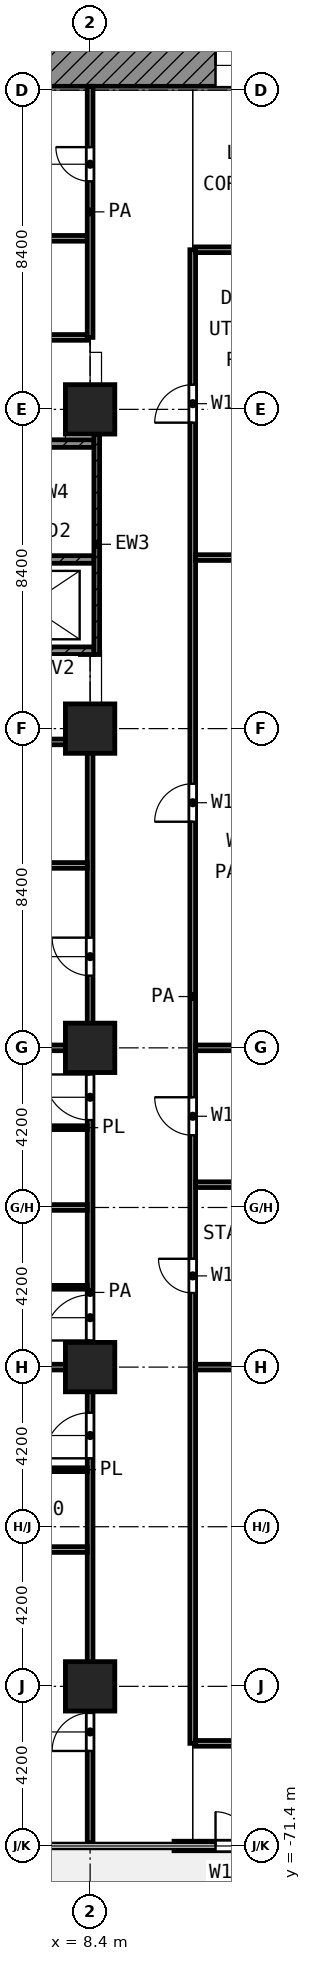
"""IFC4 building model, lengths in metres.
Left out: names, types, materials, properties, quantities, classifications, styles, units other than length and angle.
Written with IfcOpenShell. Run it as: python <this file> out.ifc"""

import sys

from ifc_helpers import new_model, si_unit, direction, frame, frame_2d, origin, origin_2d, place, context, subcontext, project, spatial, rectangle, extrude, element, fill, save


model = new_model("IFC4")
c1 = context("Model", 3, precision=1e-05, world=origin(), true_north=direction((0.0, 1.0)))
c2 = subcontext(c1, "Body", "Model", "MODEL_VIEW")
j1 = project(units=[si_unit("LENGTHUNIT", "METRE"), si_unit("PLANEANGLEUNIT", "RADIAN")], contexts=[c1])
p1 = place(None, origin())
s1 = spatial("IfcSite", under=j1, at=p1, CompositionType="ELEMENT")
p2 = place(p1, origin())
s2 = spatial("IfcBuilding", under=s1, at=p2, CompositionType="ELEMENT")
p3 = place(p2, frame((0.0, 0.0, 51.8)))
s3 = spatial("IfcBuildingStorey", under=s2, at=p3, CompositionType="ELEMENT", Elevation=51.8)
for number, where, z_axis, x_axis in (
    (1, (8.4, -33.6, 0.0), (0.0, 0.0, 1.0), (1.0, 0.0, 0.0)),
    (2, (8.4, -42.0, 0.0), (0.0, 0.0, 1.0), (1.0, 0.0, 0.0)),
    (3, (8.4, -50.4, 0.0), (0.0, 0.0, 1.0), (1.0, 0.0, 0.0)),
    (4, (8.4, -58.8, 0.0), (0.0, 0.0, 1.0), (1.0, 0.0, 0.0)),
    (5, (8.4, -67.2, 0.0), (0.0, 0.0, 1.0), (1.0, 0.0, 0.0)),
):
    element("IfcColumn", number, at=place(p3, frame(where, z_axis=z_axis, x_axis=x_axis)), inside=s3, PredefinedType="COLUMN", context=c2, shape_type="SweptSolid", body=[
        extrude(rectangle(XDim=1.3, YDim=1.3, at=origin_2d()), origin(), (0.0, 0.0, 1.0), 4.2),
    ])
p4 = place(p3, frame((10.608, -71.4, 0.0), z_axis=(0.0, 0.0, 1.0), x_axis=(1.0, 0.0, 0.0)))
e6 = element("IfcWall", 6, at=p4, inside=s3, PredefinedType="SOLIDWALL", context=c2, shape_type="SweptSolid", body=[
    extrude(rectangle(XDim=3.983, YDim=0.25, at=frame_2d((1.992, 0.0))), origin(), (0.0, 0.0, 1.0), 3.78),
])
p5 = place(p4, frame((1.092, 0.0, 0.0)))
e7 = element("IfcOpeningElement", 7, at=p5, cuts=e6, PredefinedType="OPENING", context=c2, shape_type="SweptSolid", body=[
    extrude(rectangle(XDim=1.8, YDim=2.1, at=frame_2d((0.9, 1.05))), frame((0.0, 0.135, 0.0), z_axis=(0.0, -1.0, 0.0), x_axis=(1.0, 0.0, 0.0)), (0.0, 0.0, 1.0), 0.27),
])
p6 = place(p3, frame((5.4, -24.55, 0.0), z_axis=(0.0, 0.0, 1.0), x_axis=(1.0, 0.0, 0.0)))
e8 = element("IfcWall", 8, at=p6, inside=s3, PredefinedType="SHEAR", context=c2, shape_type="SweptSolid", body=[
    extrude(rectangle(XDim=18.6, YDim=1.1, at=frame_2d((9.3, 0.0))), origin(), (0.0, 0.0, 1.0), 3.9),
])
p7 = place(p6, frame((6.3, 0.0, 0.0)))
e9 = element("IfcOpeningElement", 9, at=p7, cuts=e8, PredefinedType="OPENING", context=c2, shape_type="SweptSolid", body=[
    extrude(rectangle(XDim=1.8, YDim=2.1, at=frame_2d((0.9, 1.05))), frame((0.0, 0.56, 0.0), z_axis=(0.0, -1.0, 0.0), x_axis=(1.0, 0.0, 0.0)), (0.0, 0.0, 1.0), 1.12),
])
p8 = place(p3, frame((8.575, -40.05, 0.0), z_axis=(0.0, 0.0, 1.0), x_axis=(0.0, 1.0, 0.0)))
e10 = element("IfcWall", 10, at=p8, inside=s3, PredefinedType="SHEAR", context=c2, shape_type="SweptSolid", body=[
    extrude(rectangle(XDim=5.8, YDim=0.15, at=frame_2d((2.9, 0.0))), origin(), (0.0, 0.0, 1.0), 3.9),
])
p9 = place(p3, frame((0.45, -34.5, 0.0), z_axis=(0.0, 0.0, 1.0), x_axis=(1.0, 0.0, 0.0)))
e11 = element("IfcWall", 11, at=p9, inside=s3, PredefinedType="SHEAR", context=c2, shape_type="SweptSolid", body=[
    extrude(rectangle(XDim=8.05, YDim=0.2, at=frame_2d((4.025, 0.0))), origin(), (0.0, 0.0, 1.0), 3.9),
])
p10 = place(p9, frame((0.75, 0.0, 0.0)))
e12 = element("IfcOpeningElement", 12, at=p10, cuts=e11, PredefinedType="OPENING", context=c2, shape_type="SweptSolid", body=[
    extrude(rectangle(XDim=1.1, YDim=2.1, at=frame_2d((0.55, 1.05))), frame((0.0, 0.11, 0.0), z_axis=(0.0, -1.0, 0.0), x_axis=(1.0, 0.0, 0.0)), (0.0, 0.0, 1.0), 0.22),
])
p11 = place(p3, frame((0.45, -37.55, 0.0), z_axis=(0.0, 0.0, 1.0), x_axis=(1.0, 0.0, 0.0)))
e13 = element("IfcWall", 13, at=p11, inside=s3, PredefinedType="SHEAR", context=c2, shape_type="SweptSolid", body=[
    extrude(rectangle(XDim=8.05, YDim=0.2, at=frame_2d((4.025, 0.0))), origin(), (0.0, 0.0, 1.0), 3.9),
])
p12 = place(p11, frame((0.1, 0.0, 0.0)))
e14 = element("IfcOpeningElement", 14, at=p12, cuts=e13, PredefinedType="OPENING", context=c2, shape_type="SweptSolid", body=[
    extrude(rectangle(XDim=1.1, YDim=2.1, at=frame_2d((0.55, 1.05))), frame((0.0, 0.11, 0.0), z_axis=(0.0, -1.0, 0.0), x_axis=(1.0, 0.0, 0.0)), (0.0, 0.0, 1.0), 0.22),
])
p13 = place(p3, frame((0.45, -39.95, 0.0), z_axis=(0.0, 0.0, 1.0), x_axis=(1.0, 0.0, 0.0)))
e15 = element("IfcWall", 15, at=p13, inside=s3, PredefinedType="SHEAR", context=c2, shape_type="SweptSolid", body=[
    extrude(rectangle(XDim=8.05, YDim=0.2, at=frame_2d((4.025, 0.0))), origin(), (0.0, 0.0, 1.0), 3.9),
])
p14 = place(p13, frame((2.0, 0.0, 0.0)))
e16 = element("IfcOpeningElement", 16, at=p14, cuts=e15, PredefinedType="OPENING", context=c2, shape_type="SweptSolid", body=[
    extrude(rectangle(XDim=1.1, YDim=2.1, at=frame_2d((0.55, 1.05))), frame((0.0, 0.11, 0.0), z_axis=(0.0, -1.0, 0.0), x_axis=(1.0, 0.0, 0.0)), (0.0, 0.0, 1.0), 0.22),
])
p15 = place(p3, frame((5.15, -61.5, 0.0), z_axis=(0.0, 0.0, 1.0), x_axis=(1.0, 0.0, 0.0)))
e17 = element("IfcWall", 17, at=p15, inside=s3, PredefinedType="PARTITIONING", context=c2, shape_type="SweptSolid", body=[
    extrude(rectangle(XDim=3.175, YDim=0.1, at=frame_2d((1.587, 0.0))), origin(), (0.0, 0.0, 1.0), 3.9),
])
for number, where, z_axis, x_axis in (
    (18, (5.75, -56.7, 0.0), (0.0, 0.0, 1.0), (1.0, 0.0, 0.0)),
    (19, (5.75, -52.5, 0.0), (0.0, 0.0, 1.0), (1.0, 0.0, 0.0)),
):
    element("IfcWall", number, at=place(p3, frame(where, z_axis=z_axis, x_axis=x_axis)), inside=s3, PredefinedType="PARTITIONING", context=c2, shape_type="SweptSolid", body=[
        extrude(rectangle(XDim=2.575, YDim=0.1, at=frame_2d((1.288, 0.0))), origin(), (0.0, 0.0, 1.0), 3.9),
    ])
p16 = place(p3, frame((11.175, -68.7, 0.0), z_axis=(0.0, 0.0, 1.0), x_axis=(1.0, 0.0, 0.0)))
e20 = element("IfcWall", 20, at=p16, inside=s3, PredefinedType="PARTITIONING", context=c2, shape_type="SweptSolid", body=[
    extrude(rectangle(XDim=2.85, YDim=0.15, at=frame_2d((1.425, 0.0))), origin(), (0.0, 0.0, 1.0), 3.9),
])
for number, where, z_axis, x_axis in (
    (21, (0.08, -63.6, 0.0), (0.0, 0.0, 1.0), (1.0, 0.0, 0.0)),
    (22, (0.08, -58.8, 0.0), (0.0, 0.0, 1.0), (1.0, 0.0, 0.0)),
):
    element("IfcWall", number, at=place(p3, frame(where, z_axis=z_axis, x_axis=x_axis)), inside=s3, PredefinedType="PARTITIONING", context=c2, shape_type="SweptSolid", body=[
        extrude(rectangle(XDim=8.245, YDim=0.15, at=frame_2d((4.123, 0.0))), origin(), (0.0, 0.0, 1.0), 3.9),
    ])
p17 = place(p3, frame((11.175, -58.8, 0.0), z_axis=(0.0, 0.0, 1.0), x_axis=(1.0, 0.0, 0.0)))
e23 = element("IfcWall", 23, at=p17, inside=s3, PredefinedType="PARTITIONING", context=c2, shape_type="SweptSolid", body=[
    extrude(rectangle(XDim=2.85, YDim=0.15, at=frame_2d((1.425, 0.0))), origin(), (0.0, 0.0, 1.0), 3.9),
])
p18 = place(p3, frame((0.08, -54.6, 0.0), z_axis=(0.0, 0.0, 1.0), x_axis=(1.0, 0.0, 0.0)))
e24 = element("IfcWall", 24, at=p18, inside=s3, PredefinedType="PARTITIONING", context=c2, shape_type="SweptSolid", body=[
    extrude(rectangle(XDim=8.245, YDim=0.15, at=frame_2d((4.123, 0.0))), origin(), (0.0, 0.0, 1.0), 3.9),
])
p19 = place(p3, frame((11.175, -54.0, 0.0), z_axis=(0.0, 0.0, 1.0), x_axis=(1.0, 0.0, 0.0)))
e25 = element("IfcWall", 25, at=p19, inside=s3, PredefinedType="PARTITIONING", context=c2, shape_type="SweptSolid", body=[
    extrude(rectangle(XDim=2.85, YDim=0.15, at=frame_2d((1.425, 0.0))), origin(), (0.0, 0.0, 1.0), 3.9),
])
p20 = place(p3, frame((0.08, -50.4, 0.0), z_axis=(0.0, 0.0, 1.0), x_axis=(1.0, 0.0, 0.0)))
e26 = element("IfcWall", 26, at=p20, inside=s3, PredefinedType="PARTITIONING", context=c2, shape_type="SweptSolid", body=[
    extrude(rectangle(XDim=8.245, YDim=0.15, at=frame_2d((4.123, 0.0))), origin(), (0.0, 0.0, 1.0), 3.9),
])
p21 = place(p3, frame((11.175, -50.4, 0.0), z_axis=(0.0, 0.0, 1.0), x_axis=(1.0, 0.0, 0.0)))
e27 = element("IfcWall", 27, at=p21, inside=s3, PredefinedType="PARTITIONING", context=c2, shape_type="SweptSolid", body=[
    extrude(rectangle(XDim=2.85, YDim=0.15, at=frame_2d((1.425, 0.0))), origin(), (0.0, 0.0, 1.0), 3.9),
])
p22 = place(p3, frame((0.08, -45.6, 0.0), z_axis=(0.0, 0.0, 1.0), x_axis=(1.0, 0.0, 0.0)))
e28 = element("IfcWall", 28, at=p22, inside=s3, PredefinedType="PARTITIONING", context=c2, shape_type="SweptSolid", body=[
    extrude(rectangle(XDim=8.245, YDim=0.15, at=frame_2d((4.123, 0.0))), origin(), (0.0, 0.0, 1.0), 3.9),
])
p23 = place(p3, frame((2.327, -42.35, 0.0), z_axis=(0.0, 0.0, 1.0), x_axis=(1.0, 0.0, 0.0)))
e29 = element("IfcWall", 29, at=p23, inside=s3, PredefinedType="PARTITIONING", context=c2, shape_type="SweptSolid", body=[
    extrude(rectangle(XDim=5.998, YDim=0.15, at=frame_2d((2.999, 0.0))), origin(), (0.0, 0.0, 1.0), 3.9),
])
p24 = place(p23, frame((2.499, 0.0, 0.0)))
e30 = element("IfcOpeningElement", 30, at=p24, cuts=e29, PredefinedType="OPENING", context=c2, shape_type="SweptSolid", body=[
    extrude(rectangle(XDim=1.0, YDim=2.1, at=frame_2d((0.5, 1.05))), frame((0.0, 0.085, 0.0), z_axis=(0.0, -1.0, 0.0), x_axis=(1.0, 0.0, 0.0)), (0.0, 0.0, 1.0), 0.17),
])
p25 = place(p3, frame((11.175, -37.5, 0.0), z_axis=(0.0, 0.0, 1.0), x_axis=(1.0, 0.0, 0.0)))
e31 = element("IfcWall", 31, at=p25, inside=s3, PredefinedType="PARTITIONING", context=c2, shape_type="SweptSolid", body=[
    extrude(rectangle(XDim=2.85, YDim=0.15, at=frame_2d((1.425, 0.0))), origin(), (0.0, 0.0, 1.0), 3.9),
])
p26 = place(p3, frame((1.077, -31.707, 0.0), z_axis=(0.0, 0.0, 1.0), x_axis=(1.0, 0.0, 0.0)))
e32 = element("IfcWall", 32, at=p26, inside=s3, PredefinedType="PARTITIONING", context=c2, shape_type="SweptSolid", body=[
    extrude(rectangle(XDim=7.248, YDim=0.15, at=frame_2d((3.624, 0.0))), origin(), (0.0, 0.0, 1.0), 3.9),
])
p27 = place(p26, frame((3.024, 0.0, 0.0)))
e33 = element("IfcOpeningElement", 33, at=p27, cuts=e32, PredefinedType="OPENING", context=c2, shape_type="SweptSolid", body=[
    extrude(rectangle(XDim=1.2, YDim=2.1, at=frame_2d((0.6, 1.05))), frame((0.0, 0.085, 0.0), z_axis=(0.0, -1.0, 0.0), x_axis=(1.0, 0.0, 0.0)), (0.0, 0.0, 1.0), 0.17),
])
p28 = place(p3, frame((11.175, -29.4, 0.0), z_axis=(0.0, 0.0, 1.0), x_axis=(1.0, 0.0, 0.0)))
e34 = element("IfcWall", 34, at=p28, inside=s3, PredefinedType="PARTITIONING", context=c2, shape_type="SweptSolid", body=[
    extrude(rectangle(XDim=2.85, YDim=0.15, at=frame_2d((1.425, 0.0))), origin(), (0.0, 0.0, 1.0), 3.9),
])
p29 = place(p3, frame((0.08, -29.1, 0.0), z_axis=(0.0, 0.0, 1.0), x_axis=(1.0, 0.0, 0.0)))
e35 = element("IfcWall", 35, at=p29, inside=s3, PredefinedType="PARTITIONING", context=c2, shape_type="SweptSolid", body=[
    extrude(rectangle(XDim=8.245, YDim=0.15, at=frame_2d((4.123, 0.0))), origin(), (0.0, 0.0, 1.0), 3.9),
])
p30 = place(p3, frame((8.4, -71.32, 0.0), z_axis=(0.0, 0.0, 1.0), x_axis=(0.0, 1.0, 0.0)))
e36 = element("IfcWall", 36, at=p30, inside=s3, PredefinedType="PARTITIONING", context=c2, shape_type="SweptSolid", body=[
    extrude(rectangle(XDim=28.97, YDim=0.15, at=frame_2d((14.485, 0.0))), origin(), (0.0, 0.0, 1.0), 3.9),
])
p31 = place(p30, frame((22.82, 0.0, 0.0)))
e37 = element("IfcOpeningElement", 37, at=p31, cuts=e36, PredefinedType="OPENING", context=c2, shape_type="SweptSolid", body=[
    extrude(rectangle(XDim=1.0, YDim=2.1, at=frame_2d((0.5, 1.05))), frame((0.0, 0.085, 0.0), z_axis=(0.0, -1.0, 0.0), x_axis=(1.0, 0.0, 0.0)), (0.0, 0.0, 1.0), 0.17),
])
p32 = place(p30, frame((19.02, 0.0, 0.0)))
e38 = element("IfcOpeningElement", 38, at=p32, cuts=e36, PredefinedType="OPENING", context=c2, shape_type="SweptSolid", body=[
    extrude(rectangle(XDim=1.2, YDim=2.1, at=frame_2d((0.6, 1.05))), frame((0.0, 0.085, 0.0), z_axis=(0.0, -1.0, 0.0), x_axis=(1.0, 0.0, 0.0)), (0.0, 0.0, 1.0), 0.17),
])
p33 = place(p30, frame((13.22, 0.0, 0.0)))
e39 = element("IfcOpeningElement", 39, at=p33, cuts=e36, PredefinedType="OPENING", context=c2, shape_type="SweptSolid", body=[
    extrude(rectangle(XDim=1.2, YDim=2.1, at=frame_2d((0.6, 1.05))), frame((0.0, 0.085, 0.0), z_axis=(0.0, -1.0, 0.0), x_axis=(1.0, 0.0, 0.0)), (0.0, 0.0, 1.0), 0.17),
])
p34 = place(p30, frame((10.12, 0.0, 0.0)))
e40 = element("IfcOpeningElement", 40, at=p34, cuts=e36, PredefinedType="OPENING", context=c2, shape_type="SweptSolid", body=[
    extrude(rectangle(XDim=1.2, YDim=2.1, at=frame_2d((0.6, 1.05))), frame((0.0, 0.085, 0.0), z_axis=(0.0, -1.0, 0.0), x_axis=(1.0, 0.0, 0.0)), (0.0, 0.0, 1.0), 0.17),
])
p35 = place(p30, frame((2.42, 0.0, 0.0)))
e41 = element("IfcOpeningElement", 41, at=p35, cuts=e36, PredefinedType="OPENING", context=c2, shape_type="SweptSolid", body=[
    extrude(rectangle(XDim=1.0, YDim=2.1, at=frame_2d((0.5, 1.05))), frame((0.0, 0.085, 0.0), z_axis=(0.0, -1.0, 0.0), x_axis=(1.0, 0.0, 0.0)), (0.0, 0.0, 1.0), 0.17),
])
p36 = place(p3, frame((8.4, -31.707, 0.0), z_axis=(0.0, 0.0, 1.0), x_axis=(0.0, 1.0, 0.0)))
e42 = element("IfcWall", 42, at=p36, inside=s3, PredefinedType="PARTITIONING", context=c2, shape_type="SweptSolid", body=[
    extrude(rectangle(XDim=6.607, YDim=0.15, at=frame_2d((3.303, 0.0))), origin(), (0.0, 0.0, 1.0), 3.9),
])
p37 = place(p36, frame((4.107, 0.0, 0.0)))
e43 = element("IfcOpeningElement", 43, at=p37, cuts=e42, PredefinedType="OPENING", context=c2, shape_type="SweptSolid", body=[
    extrude(rectangle(XDim=0.9, YDim=2.1, at=frame_2d((0.45, 1.05))), frame((0.0, 0.085, 0.0), z_axis=(0.0, -1.0, 0.0), x_axis=(1.0, 0.0, 0.0)), (0.0, 0.0, 1.0), 0.17),
])
p38 = place(p3, frame((11.1, -68.7, 0.0), z_axis=(0.0, 0.0, 1.0), x_axis=(0.0, 1.0, 0.0)))
e44 = element("IfcWall", 44, at=p38, inside=s3, PredefinedType="PARTITIONING", context=c2, shape_type="SweptSolid", body=[
    extrude(rectangle(XDim=39.3, YDim=0.15, at=frame_2d((19.65, 0.0))), origin(), (0.0, 0.0, 1.0), 3.9),
])
p39 = place(p38, frame((34.75, 0.0, 0.0)))
e45 = element("IfcOpeningElement", 45, at=p39, cuts=e44, PredefinedType="OPENING", context=c2, shape_type="SweptSolid", body=[
    extrude(rectangle(XDim=1.0, YDim=2.1, at=frame_2d((0.5, 1.05))), frame((0.0, 0.085, 0.0), z_axis=(0.0, -1.0, 0.0), x_axis=(1.0, 0.0, 0.0)), (0.0, 0.0, 1.0), 0.17),
])
p40 = place(p38, frame((24.25, 0.0, 0.0)))
e46 = element("IfcOpeningElement", 46, at=p40, cuts=e44, PredefinedType="OPENING", context=c2, shape_type="SweptSolid", body=[
    extrude(rectangle(XDim=1.0, YDim=2.1, at=frame_2d((0.5, 1.05))), frame((0.0, 0.085, 0.0), z_axis=(0.0, -1.0, 0.0), x_axis=(1.0, 0.0, 0.0)), (0.0, 0.0, 1.0), 0.17),
])
p41 = place(p38, frame((16.0, 0.0, 0.0)))
e47 = element("IfcOpeningElement", 47, at=p41, cuts=e44, PredefinedType="OPENING", context=c2, shape_type="SweptSolid", body=[
    extrude(rectangle(XDim=1.0, YDim=2.1, at=frame_2d((0.5, 1.05))), frame((0.0, 0.085, 0.0), z_axis=(0.0, -1.0, 0.0), x_axis=(1.0, 0.0, 0.0)), (0.0, 0.0, 1.0), 0.17),
])
p42 = place(p38, frame((11.85, 0.0, 0.0)))
e48 = element("IfcOpeningElement", 48, at=p42, cuts=e44, PredefinedType="OPENING", context=c2, shape_type="SweptSolid", body=[
    extrude(rectangle(XDim=0.9, YDim=2.1, at=frame_2d((0.45, 1.05))), frame((0.0, 0.085, 0.0), z_axis=(0.0, -1.0, 0.0), x_axis=(1.0, 0.0, 0.0)), (0.0, 0.0, 1.0), 0.17),
])
p43 = place(p5, origin())
e49 = element("IfcDoor", 49, at=p43, inside=s3, OperationType="DOUBLE_DOOR_SINGLE_SWING", PredefinedType="DOOR", context=c2, shape_type="SweptSolid", body=[
    extrude(rectangle(XDim=1.8, YDim=2.1, at=frame_2d((0.9, 1.05))), frame((0.0, 0.025, 0.0), z_axis=(0.0, -1.0, 0.0), x_axis=(1.0, 0.0, 0.0)), (0.0, 0.0, 1.0), 0.05),
])
fill(e7, e49)
p44 = place(p7, origin())
e50 = element("IfcDoor", 50, at=p44, inside=s3, OperationType="DOUBLE_DOOR_SINGLE_SWING", PredefinedType="DOOR", context=c2, shape_type="SweptSolid", body=[
    extrude(rectangle(XDim=1.8, YDim=2.1, at=frame_2d((0.9, 1.05))), frame((0.0, 0.025, 0.0), z_axis=(0.0, -1.0, 0.0), x_axis=(1.0, 0.0, 0.0)), (0.0, 0.0, 1.0), 0.05),
])
fill(e9, e50)
p45 = place(p37, origin())
e51 = element("IfcDoor", 51, at=p45, inside=s3, OperationType="SINGLE_SWING_RIGHT", PredefinedType="DOOR", context=c2, shape_type="SweptSolid", body=[
    extrude(rectangle(XDim=0.9, YDim=2.1, at=frame_2d((0.45, 1.05))), frame((0.0, 0.025, 0.0), z_axis=(0.0, -1.0, 0.0), x_axis=(1.0, 0.0, 0.0)), (0.0, 0.0, 1.0), 0.05),
])
fill(e43, e51)
p46 = place(p31, origin())
e52 = element("IfcDoor", 52, at=p46, inside=s3, OperationType="SINGLE_SWING_RIGHT", PredefinedType="DOOR", context=c2, shape_type="SweptSolid", body=[
    extrude(rectangle(XDim=1.0, YDim=2.1, at=frame_2d((0.5, 1.05))), frame((0.0, 0.025, 0.0), z_axis=(0.0, -1.0, 0.0), x_axis=(1.0, 0.0, 0.0)), (0.0, 0.0, 1.0), 0.05),
])
fill(e37, e52)
p47 = place(p32, origin())
e53 = element("IfcDoor", 53, at=p47, inside=s3, OperationType="SINGLE_SWING_RIGHT", PredefinedType="DOOR", context=c2, shape_type="SweptSolid", body=[
    extrude(rectangle(XDim=1.2, YDim=2.1, at=frame_2d((0.6, 1.05))), frame((0.0, 0.025, 0.0), z_axis=(0.0, -1.0, 0.0), x_axis=(1.0, 0.0, 0.0)), (0.0, 0.0, 1.0), 0.05),
])
fill(e38, e53)
p48 = place(p33, origin())
e54 = element("IfcDoor", 54, at=p48, inside=s3, OperationType="SINGLE_SWING_LEFT", PredefinedType="DOOR", context=c2, shape_type="SweptSolid", body=[
    extrude(rectangle(XDim=1.2, YDim=2.1, at=frame_2d((0.6, 1.05))), frame((0.0, 0.025, 0.0), z_axis=(0.0, -1.0, 0.0), x_axis=(1.0, 0.0, 0.0)), (0.0, 0.0, 1.0), 0.05),
])
fill(e39, e54)
p49 = place(p34, origin())
e55 = element("IfcDoor", 55, at=p49, inside=s3, OperationType="SINGLE_SWING_LEFT", PredefinedType="DOOR", context=c2, shape_type="SweptSolid", body=[
    extrude(rectangle(XDim=1.2, YDim=2.1, at=frame_2d((0.6, 1.05))), frame((0.0, 0.025, 0.0), z_axis=(0.0, -1.0, 0.0), x_axis=(1.0, 0.0, 0.0)), (0.0, 0.0, 1.0), 0.05),
])
fill(e40, e55)
p50 = place(p35, origin())
e56 = element("IfcDoor", 56, at=p50, inside=s3, OperationType="SINGLE_SWING_LEFT", PredefinedType="DOOR", context=c2, shape_type="SweptSolid", body=[
    extrude(rectangle(XDim=1.0, YDim=2.1, at=frame_2d((0.5, 1.05))), frame((0.0, 0.025, 0.0), z_axis=(0.0, -1.0, 0.0), x_axis=(1.0, 0.0, 0.0)), (0.0, 0.0, 1.0), 0.05),
])
fill(e41, e56)
p51 = place(p39, origin())
e57 = element("IfcDoor", 57, at=p51, inside=s3, OperationType="SINGLE_SWING_LEFT", PredefinedType="DOOR", context=c2, shape_type="SweptSolid", body=[
    extrude(rectangle(XDim=1.0, YDim=2.1, at=frame_2d((0.5, 1.05))), frame((0.0, 0.025, 0.0), z_axis=(0.0, -1.0, 0.0), x_axis=(1.0, 0.0, 0.0)), (0.0, 0.0, 1.0), 0.05),
])
fill(e45, e57)
p52 = place(p40, origin())
e58 = element("IfcDoor", 58, at=p52, inside=s3, OperationType="SINGLE_SWING_LEFT", PredefinedType="DOOR", context=c2, shape_type="SweptSolid", body=[
    extrude(rectangle(XDim=1.0, YDim=2.1, at=frame_2d((0.5, 1.05))), frame((0.0, 0.025, 0.0), z_axis=(0.0, -1.0, 0.0), x_axis=(1.0, 0.0, 0.0)), (0.0, 0.0, 1.0), 0.05),
])
fill(e46, e58)
p53 = place(p41, origin())
e59 = element("IfcDoor", 59, at=p53, inside=s3, OperationType="SINGLE_SWING_RIGHT", PredefinedType="DOOR", context=c2, shape_type="SweptSolid", body=[
    extrude(rectangle(XDim=1.0, YDim=2.1, at=frame_2d((0.5, 1.05))), frame((0.0, 0.025, 0.0), z_axis=(0.0, -1.0, 0.0), x_axis=(1.0, 0.0, 0.0)), (0.0, 0.0, 1.0), 0.05),
])
fill(e47, e59)
p54 = place(p42, origin())
e60 = element("IfcDoor", 60, at=p54, inside=s3, OperationType="SINGLE_SWING_RIGHT", PredefinedType="DOOR", context=c2, shape_type="SweptSolid", body=[
    extrude(rectangle(XDim=0.9, YDim=2.1, at=frame_2d((0.45, 1.05))), frame((0.0, 0.025, 0.0), z_axis=(0.0, -1.0, 0.0), x_axis=(1.0, 0.0, 0.0)), (0.0, 0.0, 1.0), 0.05),
])
fill(e48, e60)
save(model, sys.argv[1])
